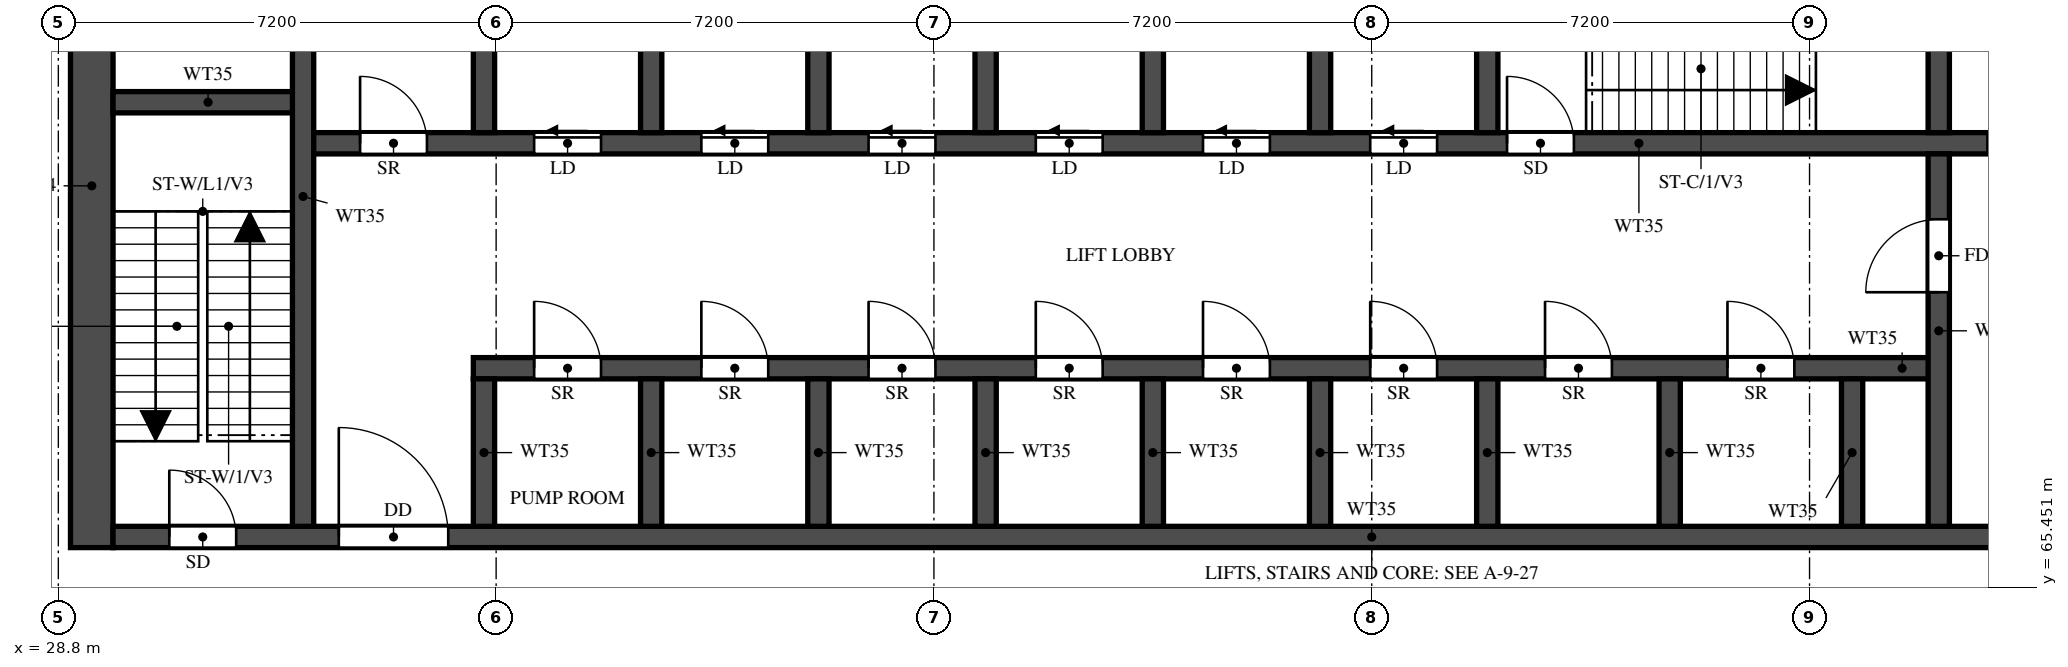
"""IFC4 building model, lengths in metres.
Left out: names, types, materials, properties, quantities, classifications, styles, units other than length and angle.
Written with IfcOpenShell. Run it as: python <this file> out.ifc"""

import sys

from ifc_helpers import new_model, si_unit, direction, frame, frame_2d, origin, place, context, subcontext, project, spatial, rectangle, extrude, element, fill, save


model = new_model("IFC4")
c1 = context("Model", 3, precision=1e-05, world=origin(), true_north=direction((0.0, 1.0)))
c2 = subcontext(c1, "Body", "Model", "MODEL_VIEW")
j1 = project(units=[si_unit("LENGTHUNIT", "METRE"), si_unit("PLANEANGLEUNIT", "RADIAN")], contexts=[c1])
p1 = place(None, origin())
s1 = spatial("IfcSite", under=j1, at=p1, CompositionType="ELEMENT")
p2 = place(p1, origin())
s2 = spatial("IfcBuilding", under=s1, at=p2, CompositionType="ELEMENT")
p3 = place(p2, frame((0.0, 0.0, 206.0)))
s3 = spatial("IfcBuildingStorey", under=s2, at=p3, CompositionType="ELEMENT", Elevation=206.0)
p4 = place(p3, frame((29.35, 66.1, 0.0), z_axis=(0.0, 0.0, 1.0), x_axis=(0.0, 1.0, 0.0)))
e1 = element("IfcWall", 1, at=p4, inside=s3, PredefinedType="SHEAR", context=c2, shape_type="SweptSolid", body=[
    extrude(rectangle(XDim=11.9, YDim=0.7, at=frame_2d((5.95, 0.0))), origin(), (0.0, 0.0, 1.0), 5.22),
])
p5 = place(p3, frame((29.7, 66.275, 0.0), z_axis=(0.0, 0.0, 1.0), x_axis=(1.0, 0.0, 0.0)))
e2 = element("IfcWall", 2, at=p5, inside=s3, PredefinedType="SHEAR", context=c2, shape_type="SweptSolid", body=[
    extrude(rectangle(XDim=41.4, YDim=0.35, at=frame_2d((20.7, 0.0))), origin(), (0.0, 0.0, 1.0), 5.22),
])
p6 = place(p5, frame((0.925, 0.0, 0.0)))
e3 = element("IfcOpeningElement", 3, at=p6, cuts=e2, PredefinedType="OPENING", context=c2, shape_type="SweptSolid", body=[
    extrude(rectangle(XDim=1.1, YDim=2.1, at=frame_2d((0.55, 1.05))), frame((0.0, 0.185, 0.0), z_axis=(0.0, -1.0, 0.0), x_axis=(1.0, 0.0, 0.0)), (0.0, 0.0, 1.0), 0.37),
])
p7 = place(p5, frame((3.712, 0.0, 0.0)))
e4 = element("IfcOpeningElement", 4, at=p7, cuts=e2, PredefinedType="OPENING", context=c2, shape_type="SweptSolid", body=[
    extrude(rectangle(XDim=1.8, YDim=2.1, at=frame_2d((0.9, 1.05))), frame((0.0, 0.185, 0.0), z_axis=(0.0, -1.0, 0.0), x_axis=(1.0, 0.0, 0.0)), (0.0, 0.0, 1.0), 0.37),
])
p8 = place(p3, frame((35.625, 69.05, 0.0), z_axis=(0.0, 0.0, 1.0), x_axis=(1.0, 0.0, 0.0)))
e5 = element("IfcWall", 5, at=p8, inside=s3, PredefinedType="SHEAR", context=c2, shape_type="SweptSolid", body=[
    extrude(rectangle(XDim=24.1, YDim=0.35, at=frame_2d((12.05, 0.0))), origin(), (0.0, 0.0, 1.0), 5.22),
])
p9 = place(p8, frame((1.0, 0.0, 0.0)))
e6 = element("IfcOpeningElement", 6, at=p9, cuts=e5, PredefinedType="OPENING", context=c2, shape_type="SweptSolid", body=[
    extrude(rectangle(XDim=1.1, YDim=2.1, at=frame_2d((0.55, 1.05))), frame((0.0, 0.185, 0.0), z_axis=(0.0, -1.0, 0.0), x_axis=(1.0, 0.0, 0.0)), (0.0, 0.0, 1.0), 0.37),
])
p10 = place(p8, frame((3.75, 0.0, 0.0)))
e7 = element("IfcOpeningElement", 7, at=p10, cuts=e5, PredefinedType="OPENING", context=c2, shape_type="SweptSolid", body=[
    extrude(rectangle(XDim=1.1, YDim=2.1, at=frame_2d((0.55, 1.05))), frame((0.0, 0.185, 0.0), z_axis=(0.0, -1.0, 0.0), x_axis=(1.0, 0.0, 0.0)), (0.0, 0.0, 1.0), 0.37),
])
p11 = place(p8, frame((6.5, 0.0, 0.0)))
e8 = element("IfcOpeningElement", 8, at=p11, cuts=e5, PredefinedType="OPENING", context=c2, shape_type="SweptSolid", body=[
    extrude(rectangle(XDim=1.1, YDim=2.1, at=frame_2d((0.55, 1.05))), frame((0.0, 0.185, 0.0), z_axis=(0.0, -1.0, 0.0), x_axis=(1.0, 0.0, 0.0)), (0.0, 0.0, 1.0), 0.37),
])
p12 = place(p8, frame((9.25, 0.0, 0.0)))
e9 = element("IfcOpeningElement", 9, at=p12, cuts=e5, PredefinedType="OPENING", context=c2, shape_type="SweptSolid", body=[
    extrude(rectangle(XDim=1.1, YDim=2.1, at=frame_2d((0.55, 1.05))), frame((0.0, 0.185, 0.0), z_axis=(0.0, -1.0, 0.0), x_axis=(1.0, 0.0, 0.0)), (0.0, 0.0, 1.0), 0.37),
])
p13 = place(p8, frame((12.0, 0.0, 0.0)))
e10 = element("IfcOpeningElement", 10, at=p13, cuts=e5, PredefinedType="OPENING", context=c2, shape_type="SweptSolid", body=[
    extrude(rectangle(XDim=1.1, YDim=2.1, at=frame_2d((0.55, 1.05))), frame((0.0, 0.185, 0.0), z_axis=(0.0, -1.0, 0.0), x_axis=(1.0, 0.0, 0.0)), (0.0, 0.0, 1.0), 0.37),
])
p14 = place(p8, frame((14.75, 0.0, 0.0)))
e11 = element("IfcOpeningElement", 11, at=p14, cuts=e5, PredefinedType="OPENING", context=c2, shape_type="SweptSolid", body=[
    extrude(rectangle(XDim=1.1, YDim=2.1, at=frame_2d((0.55, 1.05))), frame((0.0, 0.185, 0.0), z_axis=(0.0, -1.0, 0.0), x_axis=(1.0, 0.0, 0.0)), (0.0, 0.0, 1.0), 0.37),
])
p15 = place(p8, frame((17.625, 0.0, 0.0)))
e12 = element("IfcOpeningElement", 12, at=p15, cuts=e5, PredefinedType="OPENING", context=c2, shape_type="SweptSolid", body=[
    extrude(rectangle(XDim=1.1, YDim=2.1, at=frame_2d((0.55, 1.05))), frame((0.0, 0.185, 0.0), z_axis=(0.0, -1.0, 0.0), x_axis=(1.0, 0.0, 0.0)), (0.0, 0.0, 1.0), 0.37),
])
p16 = place(p8, frame((20.625, 0.0, 0.0)))
e13 = element("IfcOpeningElement", 13, at=p16, cuts=e5, PredefinedType="OPENING", context=c2, shape_type="SweptSolid", body=[
    extrude(rectangle(XDim=1.1, YDim=2.1, at=frame_2d((0.55, 1.05))), frame((0.0, 0.185, 0.0), z_axis=(0.0, -1.0, 0.0), x_axis=(1.0, 0.0, 0.0)), (0.0, 0.0, 1.0), 0.37),
])
p17 = place(p3, frame((32.825, 72.75, 0.0), z_axis=(0.0, 0.0, 1.0), x_axis=(1.0, 0.0, 0.0)))
e14 = element("IfcWall", 14, at=p17, inside=s3, PredefinedType="SHEAR", context=c2, shape_type="SweptSolid", body=[
    extrude(rectangle(XDim=35.15, YDim=0.35, at=frame_2d((17.575, 0.0))), origin(), (0.0, 0.0, 1.0), 5.22),
])
p18 = place(p17, frame((19.8, 0.0, 0.0)))
e15 = element("IfcOpeningElement", 15, at=p18, cuts=e14, PredefinedType="OPENING", context=c2, shape_type="SweptSolid", body=[
    extrude(rectangle(XDim=1.1, YDim=2.1, at=frame_2d((0.55, 1.05))), frame((0.0, 0.185, 0.0), z_axis=(0.0, -1.0, 0.0), x_axis=(1.0, 0.0, 0.0)), (0.0, 0.0, 1.0), 0.37),
])
p19 = place(p17, frame((27.7, 0.0, 0.0)))
e16 = element("IfcOpeningElement", 16, at=p19, cuts=e14, PredefinedType="OPENING", context=c2, shape_type="SweptSolid", body=[
    extrude(rectangle(XDim=1.1, YDim=2.1, at=frame_2d((0.55, 1.05))), frame((0.0, 0.185, 0.0), z_axis=(0.0, -1.0, 0.0), x_axis=(1.0, 0.0, 0.0)), (0.0, 0.0, 1.0), 0.37),
])
p20 = place(p17, frame((30.3, 0.0, 0.0)))
e17 = element("IfcOpeningElement", 17, at=p20, cuts=e14, PredefinedType="OPENING", context=c2, shape_type="SweptSolid", body=[
    extrude(rectangle(XDim=1.1, YDim=2.1, at=frame_2d((0.55, 1.05))), frame((0.0, 0.185, 0.0), z_axis=(0.0, -1.0, 0.0), x_axis=(1.0, 0.0, 0.0)), (0.0, 0.0, 1.0), 0.37),
])
p21 = place(p17, frame((3.8, 0.0, 0.0)))
e18 = element("IfcOpeningElement", 18, at=p21, cuts=e14, PredefinedType="OPENING", context=c2, shape_type="SweptSolid", body=[
    extrude(rectangle(XDim=1.1, YDim=2.1, at=frame_2d((0.55, 1.05))), frame((0.0, 0.185, 0.0), z_axis=(0.0, -1.0, 0.0), x_axis=(1.0, 0.0, 0.0)), (0.0, 0.0, 1.0), 0.37),
])
p22 = place(p17, frame((6.55, 0.0, 0.0)))
e19 = element("IfcOpeningElement", 19, at=p22, cuts=e14, PredefinedType="OPENING", context=c2, shape_type="SweptSolid", body=[
    extrude(rectangle(XDim=1.1, YDim=2.1, at=frame_2d((0.55, 1.05))), frame((0.0, 0.185, 0.0), z_axis=(0.0, -1.0, 0.0), x_axis=(1.0, 0.0, 0.0)), (0.0, 0.0, 1.0), 0.37),
])
p23 = place(p17, frame((9.3, 0.0, 0.0)))
e20 = element("IfcOpeningElement", 20, at=p23, cuts=e14, PredefinedType="OPENING", context=c2, shape_type="SweptSolid", body=[
    extrude(rectangle(XDim=1.1, YDim=2.1, at=frame_2d((0.55, 1.05))), frame((0.0, 0.185, 0.0), z_axis=(0.0, -1.0, 0.0), x_axis=(1.0, 0.0, 0.0)), (0.0, 0.0, 1.0), 0.37),
])
p24 = place(p17, frame((12.05, 0.0, 0.0)))
e21 = element("IfcOpeningElement", 21, at=p24, cuts=e14, PredefinedType="OPENING", context=c2, shape_type="SweptSolid", body=[
    extrude(rectangle(XDim=1.1, YDim=2.1, at=frame_2d((0.55, 1.05))), frame((0.0, 0.185, 0.0), z_axis=(0.0, -1.0, 0.0), x_axis=(1.0, 0.0, 0.0)), (0.0, 0.0, 1.0), 0.37),
])
p25 = place(p17, frame((14.8, 0.0, 0.0)))
e22 = element("IfcOpeningElement", 22, at=p25, cuts=e14, PredefinedType="OPENING", context=c2, shape_type="SweptSolid", body=[
    extrude(rectangle(XDim=1.1, YDim=2.1, at=frame_2d((0.55, 1.05))), frame((0.0, 0.185, 0.0), z_axis=(0.0, -1.0, 0.0), x_axis=(1.0, 0.0, 0.0)), (0.0, 0.0, 1.0), 0.37),
])
p26 = place(p17, frame((17.55, 0.0, 0.0)))
e23 = element("IfcOpeningElement", 23, at=p26, cuts=e14, PredefinedType="OPENING", context=c2, shape_type="SweptSolid", body=[
    extrude(rectangle(XDim=1.1, YDim=2.1, at=frame_2d((0.55, 1.05))), frame((0.0, 0.185, 0.0), z_axis=(0.0, -1.0, 0.0), x_axis=(1.0, 0.0, 0.0)), (0.0, 0.0, 1.0), 0.37),
])
p27 = place(p17, frame((0.938, 0.0, 0.0)))
e24 = element("IfcOpeningElement", 24, at=p27, cuts=e14, PredefinedType="OPENING", context=c2, shape_type="SweptSolid", body=[
    extrude(rectangle(XDim=1.1, YDim=2.1, at=frame_2d((0.55, 1.05))), frame((0.0, 0.185, 0.0), z_axis=(0.0, -1.0, 0.0), x_axis=(1.0, 0.0, 0.0)), (0.0, 0.0, 1.0), 0.37),
])
p28 = place(p3, frame((29.7, 73.425, 0.0), z_axis=(0.0, 0.0, 1.0), x_axis=(1.0, 0.0, 0.0)))
e25 = element("IfcWall", 25, at=p28, inside=s3, PredefinedType="SHEAR", context=c2, shape_type="SweptSolid", body=[
    extrude(rectangle(XDim=3.125, YDim=0.35, at=frame_2d((1.562, 0.0))), origin(), (0.0, 0.0, 1.0), 5.22),
])
p29 = place(p3, frame((32.825, 66.45, 0.0), z_axis=(0.0, 0.0, 1.0), x_axis=(0.0, 1.0, 0.0)))
e26 = element("IfcWall", 26, at=p29, inside=s3, PredefinedType="SHEAR", context=c2, shape_type="SweptSolid", body=[
    extrude(rectangle(XDim=10.85, YDim=0.35, at=frame_2d((5.425, 0.0))), origin(), (0.0, 0.0, 1.0), 5.22),
])
p30 = place(p3, frame((59.725, 66.45, 0.0), z_axis=(0.0, 0.0, 1.0), x_axis=(0.0, 1.0, 0.0)))
e27 = element("IfcWall", 27, at=p30, inside=s3, PredefinedType="SHEAR", context=c2, shape_type="SweptSolid", body=[
    extrude(rectangle(XDim=6.125, YDim=0.35, at=frame_2d((3.062, 0.0))), origin(), (0.0, 0.0, 1.0), 5.22),
])
p31 = place(p30, frame((3.85, 0.0, 0.0)))
e28 = element("IfcOpeningElement", 28, at=p31, cuts=e27, PredefinedType="OPENING", context=c2, shape_type="SweptSolid", body=[
    extrude(rectangle(XDim=1.2, YDim=2.1, at=frame_2d((0.6, 1.05))), frame((0.0, 0.185, 0.0), z_axis=(0.0, -1.0, 0.0), x_axis=(1.0, 0.0, 0.0)), (0.0, 0.0, 1.0), 0.37),
])
p32 = place(p3, frame((59.725, 72.925, 0.0), z_axis=(0.0, 0.0, 1.0), x_axis=(0.0, 1.0, 0.0)))
e29 = element("IfcWall", 29, at=p32, inside=s3, PredefinedType="SHEAR", context=c2, shape_type="SweptSolid", body=[
    extrude(rectangle(XDim=2.95, YDim=0.35, at=frame_2d((1.475, 0.0))), origin(), (0.0, 0.0, 1.0), 5.22),
])
for number, where, z_axis, x_axis in (
    (30, (35.8, 66.45, 0.0), (0.0, 0.0, 1.0), (0.0, 1.0, 0.0)),
    (31, (38.55, 66.45, 0.0), (0.0, 0.0, 1.0), (0.0, 1.0, 0.0)),
    (32, (41.3, 66.45, 0.0), (0.0, 0.0, 1.0), (0.0, 1.0, 0.0)),
    (33, (44.05, 66.45, 0.0), (0.0, 0.0, 1.0), (0.0, 1.0, 0.0)),
    (34, (46.8, 66.45, 0.0), (0.0, 0.0, 1.0), (0.0, 1.0, 0.0)),
    (35, (49.55, 66.45, 0.0), (0.0, 0.0, 1.0), (0.0, 1.0, 0.0)),
    (36, (52.3, 66.45, 0.0), (0.0, 0.0, 1.0), (0.0, 1.0, 0.0)),
    (37, (55.3, 66.45, 0.0), (0.0, 0.0, 1.0), (0.0, 1.0, 0.0)),
    (38, (58.3, 66.45, 0.0), (0.0, 0.0, 1.0), (0.0, 1.0, 0.0)),
):
    element("IfcWall", number, at=place(p3, frame(where, z_axis=z_axis, x_axis=x_axis)), inside=s3, PredefinedType="SHEAR", context=c2, shape_type="SweptSolid", body=[
        extrude(rectangle(XDim=2.425, YDim=0.35, at=frame_2d((1.212, 0.0))), origin(), (0.0, 0.0, 1.0), 5.22),
    ])
for number, where, z_axis, x_axis in (
    (39, (35.8, 72.925, 0.0), (0.0, 0.0, 1.0), (0.0, 1.0, 0.0)),
    (40, (38.55, 72.925, 0.0), (0.0, 0.0, 1.0), (0.0, 1.0, 0.0)),
    (41, (41.3, 72.925, 0.0), (0.0, 0.0, 1.0), (0.0, 1.0, 0.0)),
    (42, (44.05, 72.925, 0.0), (0.0, 0.0, 1.0), (0.0, 1.0, 0.0)),
    (43, (46.8, 72.925, 0.0), (0.0, 0.0, 1.0), (0.0, 1.0, 0.0)),
    (44, (49.55, 72.925, 0.0), (0.0, 0.0, 1.0), (0.0, 1.0, 0.0)),
    (45, (52.3, 72.925, 0.0), (0.0, 0.0, 1.0), (0.0, 1.0, 0.0)),
):
    element("IfcWall", number, at=place(p3, frame(where, z_axis=z_axis, x_axis=x_axis)), inside=s3, PredefinedType="SHEAR", context=c2, shape_type="SweptSolid", body=[
        extrude(rectangle(XDim=2.95, YDim=0.35, at=frame_2d((1.475, 0.0))), origin(), (0.0, 0.0, 1.0), 5.22),
    ])
p33 = place(p6, origin())
e46 = element("IfcDoor", 46, at=p33, inside=s3, OperationType="SINGLE_SWING_LEFT", PredefinedType="DOOR", context=c2, shape_type="SweptSolid", body=[
    extrude(rectangle(XDim=1.1, YDim=2.1, at=frame_2d((0.55, 1.05))), frame((0.0, 0.025, 0.0), z_axis=(0.0, -1.0, 0.0), x_axis=(1.0, 0.0, 0.0)), (0.0, 0.0, 1.0), 0.05),
])
fill(e3, e46)
p34 = place(p18, origin())
e47 = element("IfcDoor", 47, at=p34, inside=s3, OperationType="SINGLE_SWING_LEFT", PredefinedType="DOOR", context=c2, shape_type="SweptSolid", body=[
    extrude(rectangle(XDim=1.1, YDim=2.1, at=frame_2d((0.55, 1.05))), frame((0.0, 0.025, 0.0), z_axis=(0.0, -1.0, 0.0), x_axis=(1.0, 0.0, 0.0)), (0.0, 0.0, 1.0), 0.05),
])
fill(e15, e47)
p35 = place(p7, origin())
e48 = element("IfcDoor", 48, at=p35, inside=s3, OperationType="DOUBLE_DOOR_SINGLE_SWING", PredefinedType="DOOR", context=c2, shape_type="SweptSolid", body=[
    extrude(rectangle(XDim=1.8, YDim=2.1, at=frame_2d((0.9, 1.05))), frame((0.0, 0.025, 0.0), z_axis=(0.0, -1.0, 0.0), x_axis=(1.0, 0.0, 0.0)), (0.0, 0.0, 1.0), 0.05),
])
fill(e4, e48)
p36 = place(p31, origin())
e49 = element("IfcDoor", 49, at=p36, inside=s3, OperationType="SINGLE_SWING_LEFT", PredefinedType="DOOR", context=c2, shape_type="SweptSolid", body=[
    extrude(rectangle(XDim=1.2, YDim=2.1, at=frame_2d((0.6, 1.05))), frame((0.0, 0.025, 0.0), z_axis=(0.0, -1.0, 0.0), x_axis=(1.0, 0.0, 0.0)), (0.0, 0.0, 1.0), 0.05),
])
fill(e28, e49)
p37 = place(p19, origin())
e50 = element("IfcDoor", 50, at=p37, inside=s3, OperationType="SLIDING_TO_LEFT", PredefinedType="DOOR", context=c2, shape_type="SweptSolid", body=[
    extrude(rectangle(XDim=1.1, YDim=2.1, at=frame_2d((0.55, 1.05))), frame((0.0, 0.025, 0.0), z_axis=(0.0, -1.0, 0.0), x_axis=(1.0, 0.0, 0.0)), (0.0, 0.0, 1.0), 0.05),
])
fill(e16, e50)
p38 = place(p9, origin())
e51 = element("IfcDoor", 51, at=p38, inside=s3, OperationType="SINGLE_SWING_RIGHT", PredefinedType="DOOR", context=c2, shape_type="SweptSolid", body=[
    extrude(rectangle(XDim=1.1, YDim=2.1, at=frame_2d((0.55, 1.05))), frame((0.0, 0.025, 0.0), z_axis=(0.0, -1.0, 0.0), x_axis=(1.0, 0.0, 0.0)), (0.0, 0.0, 1.0), 0.05),
])
fill(e6, e51)
p39 = place(p10, origin())
e52 = element("IfcDoor", 52, at=p39, inside=s3, OperationType="SINGLE_SWING_LEFT", PredefinedType="DOOR", context=c2, shape_type="SweptSolid", body=[
    extrude(rectangle(XDim=1.1, YDim=2.1, at=frame_2d((0.55, 1.05))), frame((0.0, 0.025, 0.0), z_axis=(0.0, -1.0, 0.0), x_axis=(1.0, 0.0, 0.0)), (0.0, 0.0, 1.0), 0.05),
])
fill(e7, e52)
p40 = place(p11, origin())
e53 = element("IfcDoor", 53, at=p40, inside=s3, OperationType="SINGLE_SWING_RIGHT", PredefinedType="DOOR", context=c2, shape_type="SweptSolid", body=[
    extrude(rectangle(XDim=1.1, YDim=2.1, at=frame_2d((0.55, 1.05))), frame((0.0, 0.025, 0.0), z_axis=(0.0, -1.0, 0.0), x_axis=(1.0, 0.0, 0.0)), (0.0, 0.0, 1.0), 0.05),
])
fill(e8, e53)
p41 = place(p12, origin())
e54 = element("IfcDoor", 54, at=p41, inside=s3, OperationType="SINGLE_SWING_LEFT", PredefinedType="DOOR", context=c2, shape_type="SweptSolid", body=[
    extrude(rectangle(XDim=1.1, YDim=2.1, at=frame_2d((0.55, 1.05))), frame((0.0, 0.025, 0.0), z_axis=(0.0, -1.0, 0.0), x_axis=(1.0, 0.0, 0.0)), (0.0, 0.0, 1.0), 0.05),
])
fill(e9, e54)
p42 = place(p13, origin())
e55 = element("IfcDoor", 55, at=p42, inside=s3, OperationType="SINGLE_SWING_RIGHT", PredefinedType="DOOR", context=c2, shape_type="SweptSolid", body=[
    extrude(rectangle(XDim=1.1, YDim=2.1, at=frame_2d((0.55, 1.05))), frame((0.0, 0.025, 0.0), z_axis=(0.0, -1.0, 0.0), x_axis=(1.0, 0.0, 0.0)), (0.0, 0.0, 1.0), 0.05),
])
fill(e10, e55)
p43 = place(p14, origin())
e56 = element("IfcDoor", 56, at=p43, inside=s3, OperationType="SINGLE_SWING_LEFT", PredefinedType="DOOR", context=c2, shape_type="SweptSolid", body=[
    extrude(rectangle(XDim=1.1, YDim=2.1, at=frame_2d((0.55, 1.05))), frame((0.0, 0.025, 0.0), z_axis=(0.0, -1.0, 0.0), x_axis=(1.0, 0.0, 0.0)), (0.0, 0.0, 1.0), 0.05),
])
fill(e11, e56)
p44 = place(p15, origin())
e57 = element("IfcDoor", 57, at=p44, inside=s3, OperationType="SINGLE_SWING_RIGHT", PredefinedType="DOOR", context=c2, shape_type="SweptSolid", body=[
    extrude(rectangle(XDim=1.1, YDim=2.1, at=frame_2d((0.55, 1.05))), frame((0.0, 0.025, 0.0), z_axis=(0.0, -1.0, 0.0), x_axis=(1.0, 0.0, 0.0)), (0.0, 0.0, 1.0), 0.05),
])
fill(e12, e57)
p45 = place(p16, origin())
e58 = element("IfcDoor", 58, at=p45, inside=s3, OperationType="SINGLE_SWING_RIGHT", PredefinedType="DOOR", context=c2, shape_type="SweptSolid", body=[
    extrude(rectangle(XDim=1.1, YDim=2.1, at=frame_2d((0.55, 1.05))), frame((0.0, 0.025, 0.0), z_axis=(0.0, -1.0, 0.0), x_axis=(1.0, 0.0, 0.0)), (0.0, 0.0, 1.0), 0.05),
])
fill(e13, e58)
p46 = place(p21, origin())
e59 = element("IfcDoor", 59, at=p46, inside=s3, OperationType="SLIDING_TO_LEFT", PredefinedType="DOOR", context=c2, shape_type="SweptSolid", body=[
    extrude(rectangle(XDim=1.1, YDim=2.1, at=frame_2d((0.55, 1.05))), frame((0.0, 0.025, 0.0), z_axis=(0.0, -1.0, 0.0), x_axis=(1.0, 0.0, 0.0)), (0.0, 0.0, 1.0), 0.05),
])
fill(e18, e59)
p47 = place(p22, origin())
e60 = element("IfcDoor", 60, at=p47, inside=s3, OperationType="SLIDING_TO_LEFT", PredefinedType="DOOR", context=c2, shape_type="SweptSolid", body=[
    extrude(rectangle(XDim=1.1, YDim=2.1, at=frame_2d((0.55, 1.05))), frame((0.0, 0.025, 0.0), z_axis=(0.0, -1.0, 0.0), x_axis=(1.0, 0.0, 0.0)), (0.0, 0.0, 1.0), 0.05),
])
fill(e19, e60)
p48 = place(p23, origin())
e61 = element("IfcDoor", 61, at=p48, inside=s3, OperationType="SLIDING_TO_LEFT", PredefinedType="DOOR", context=c2, shape_type="SweptSolid", body=[
    extrude(rectangle(XDim=1.1, YDim=2.1, at=frame_2d((0.55, 1.05))), frame((0.0, 0.025, 0.0), z_axis=(0.0, -1.0, 0.0), x_axis=(1.0, 0.0, 0.0)), (0.0, 0.0, 1.0), 0.05),
])
fill(e20, e61)
p49 = place(p24, origin())
e62 = element("IfcDoor", 62, at=p49, inside=s3, OperationType="SLIDING_TO_LEFT", PredefinedType="DOOR", context=c2, shape_type="SweptSolid", body=[
    extrude(rectangle(XDim=1.1, YDim=2.1, at=frame_2d((0.55, 1.05))), frame((0.0, 0.025, 0.0), z_axis=(0.0, -1.0, 0.0), x_axis=(1.0, 0.0, 0.0)), (0.0, 0.0, 1.0), 0.05),
])
fill(e21, e62)
p50 = place(p25, origin())
e63 = element("IfcDoor", 63, at=p50, inside=s3, OperationType="SLIDING_TO_LEFT", PredefinedType="DOOR", context=c2, shape_type="SweptSolid", body=[
    extrude(rectangle(XDim=1.1, YDim=2.1, at=frame_2d((0.55, 1.05))), frame((0.0, 0.025, 0.0), z_axis=(0.0, -1.0, 0.0), x_axis=(1.0, 0.0, 0.0)), (0.0, 0.0, 1.0), 0.05),
])
fill(e22, e63)
p51 = place(p26, origin())
e64 = element("IfcDoor", 64, at=p51, inside=s3, OperationType="SLIDING_TO_LEFT", PredefinedType="DOOR", context=c2, shape_type="SweptSolid", body=[
    extrude(rectangle(XDim=1.1, YDim=2.1, at=frame_2d((0.55, 1.05))), frame((0.0, 0.025, 0.0), z_axis=(0.0, -1.0, 0.0), x_axis=(1.0, 0.0, 0.0)), (0.0, 0.0, 1.0), 0.05),
])
fill(e23, e64)
p52 = place(p27, origin())
e65 = element("IfcDoor", 65, at=p52, inside=s3, OperationType="SINGLE_SWING_LEFT", PredefinedType="DOOR", context=c2, shape_type="SweptSolid", body=[
    extrude(rectangle(XDim=1.1, YDim=2.1, at=frame_2d((0.55, 1.05))), frame((0.0, 0.025, 0.0), z_axis=(0.0, -1.0, 0.0), x_axis=(1.0, 0.0, 0.0)), (0.0, 0.0, 1.0), 0.05),
])
fill(e24, e65)
save(model, sys.argv[1])
